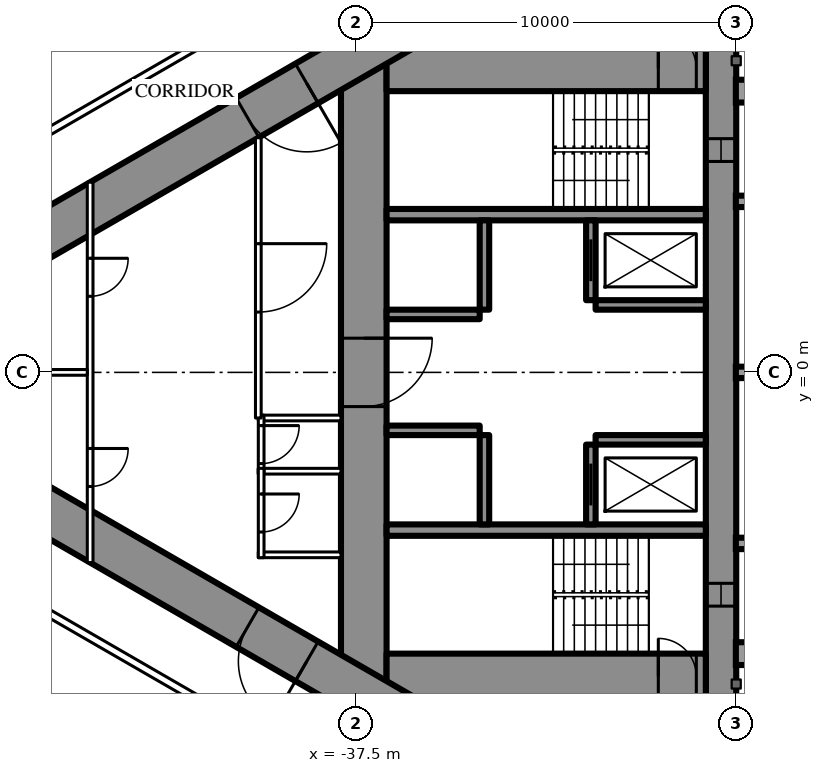
"""IFC4 building model, lengths in metres.
Left out: names, types, materials, properties, quantities, classifications, styles, units other than length and angle.
Written with IfcOpenShell. Run it as: python <this file> out.ifc"""

import sys

from ifc_helpers import new_model, si_unit, direction, frame, frame_2d, origin, place, context, subcontext, project, spatial, rectangle, extrude, element, fill, save


model = new_model("IFC4")
c1 = context("Model", 3, precision=1e-05, world=origin(), true_north=direction((0.0, 1.0)))
c2 = subcontext(c1, "Body", "Model", "MODEL_VIEW")
j1 = project(units=[si_unit("LENGTHUNIT", "METRE"), si_unit("PLANEANGLEUNIT", "RADIAN")], contexts=[c1])
p1 = place(None, origin())
s1 = spatial("IfcSite", under=j1, at=p1, CompositionType="ELEMENT")
p2 = place(p1, origin())
s2 = spatial("IfcBuilding", under=s1, at=p2, CompositionType="ELEMENT")
p3 = place(p2, frame((0.0, 0.0, 32.0)))
s3 = spatial("IfcBuildingStorey", under=s2, at=p3, CompositionType="ELEMENT", Elevation=32.0)
p4 = place(p3, frame((-27.9, 8.6, 0.0), z_axis=(0.0, 0.0, 1.0), x_axis=(0.0, -1.0, 0.0)))
e1 = element("IfcWall", 1, at=p4, inside=s3, PredefinedType="SHEAR", context=c2, shape_type="SweptSolid", body=[
    extrude(rectangle(XDim=17.2, YDim=0.8, at=frame_2d((8.6, 0.0))), origin(), (0.0, 0.0, 1.0), 3.5),
])
p5 = place(p4, frame((2.45, 0.0, 0.6)))
e2 = element("IfcOpeningElement", 2, at=p5, cuts=e1, PredefinedType="OPENING", context=c2, shape_type="SweptSolid", body=[
    extrude(rectangle(XDim=0.6, YDim=2.1, at=frame_2d((0.3, 1.05))), frame((0.0, 0.41, 0.0), z_axis=(0.0, -1.0, 0.0), x_axis=(1.0, 0.0, 0.0)), (0.0, 0.0, 1.0), 0.82),
])
p6 = place(p4, frame((14.15, 0.0, 0.6)))
e3 = element("IfcOpeningElement", 3, at=p6, cuts=e1, PredefinedType="OPENING", context=c2, shape_type="SweptSolid", body=[
    extrude(rectangle(XDim=0.6, YDim=2.1, at=frame_2d((0.3, 1.05))), frame((0.0, 0.41, 0.0), z_axis=(0.0, -1.0, 0.0), x_axis=(1.0, 0.0, 0.0)), (0.0, 0.0, 1.0), 0.82),
])
p7 = place(p3, frame((-37.3, 8.6, 0.0), z_axis=(0.0, 0.0, 1.0), x_axis=(0.0, -1.0, 0.0)))
e4 = element("IfcWall", 4, at=p7, inside=s3, PredefinedType="SHEAR", context=c2, shape_type="SweptSolid", body=[
    extrude(rectangle(XDim=17.2, YDim=1.2, at=frame_2d((8.6, 0.0))), origin(), (0.0, 0.0, 1.0), 3.5),
])
p8 = place(p7, frame((7.7, 0.0, 0.0)))
e5 = element("IfcOpeningElement", 5, at=p8, cuts=e4, PredefinedType="OPENING", context=c2, shape_type="SweptSolid", body=[
    extrude(rectangle(XDim=1.8, YDim=2.2, at=frame_2d((0.9, 1.1))), frame((0.0, 0.61, 0.0), z_axis=(0.0, -1.0, 0.0), x_axis=(1.0, 0.0, 0.0)), (0.0, 0.0, 1.0), 1.22),
])
p9 = place(p3, frame((-28.3, 8.0, 0.0), z_axis=(0.0, 0.0, 1.0), x_axis=(-1.0, 0.0, 0.0)))
e6 = element("IfcWall", 6, at=p9, inside=s3, PredefinedType="SHEAR", context=c2, shape_type="SweptSolid", body=[
    extrude(rectangle(XDim=8.4, YDim=1.2, at=frame_2d((4.2, 0.0))), origin(), (0.0, 0.0, 1.0), 3.5),
])
p10 = place(p9, frame((0.25, 0.0, 0.0)))
e7 = element("IfcOpeningElement", 7, at=p10, cuts=e6, PredefinedType="OPENING", context=c2, shape_type="SweptSolid", body=[
    extrude(rectangle(XDim=1.0, YDim=2.2, at=frame_2d((0.5, 1.1))), frame((0.0, 0.61, 0.0), z_axis=(0.0, -1.0, 0.0), x_axis=(1.0, 0.0, 0.0)), (0.0, 0.0, 1.0), 1.22),
])
p11 = place(p3, frame((-28.3, -8.0, 0.0), z_axis=(0.0, 0.0, 1.0), x_axis=(-1.0, 0.0, 0.0)))
e8 = element("IfcWall", 8, at=p11, inside=s3, PredefinedType="SHEAR", context=c2, shape_type="SweptSolid", body=[
    extrude(rectangle(XDim=8.4, YDim=1.2, at=frame_2d((4.2, 0.0))), origin(), (0.0, 0.0, 1.0), 3.5),
])
p12 = place(p11, frame((0.25, 0.0, 0.0)))
e9 = element("IfcOpeningElement", 9, at=p12, cuts=e8, PredefinedType="OPENING", context=c2, shape_type="SweptSolid", body=[
    extrude(rectangle(XDim=1.0, YDim=2.2, at=frame_2d((0.5, 1.1))), frame((0.0, 0.61, 0.0), z_axis=(0.0, -1.0, 0.0), x_axis=(1.0, 0.0, 0.0)), (0.0, 0.0, 1.0), 1.22),
])
for number, where, z_axis, x_axis in (
    (10, (-28.3, 4.15, 0.0), (0.0, 0.0, 1.0), (-1.0, 0.0, 0.0)),
    (11, (-28.3, -4.15, 0.0), (0.0, 0.0, 1.0), (-1.0, 0.0, 0.0)),
):
    element("IfcWall", number, at=place(p3, frame(where, z_axis=z_axis, x_axis=x_axis)), inside=s3, PredefinedType="SHEAR", context=c2, shape_type="SweptSolid", body=[
        extrude(rectangle(XDim=8.4, YDim=0.3, at=frame_2d((4.2, 0.0))), origin(), (0.0, 0.0, 1.0), 3.5),
    ])
p13 = place(p3, frame((-31.325, 4.0, 0.0), z_axis=(0.0, 0.0, 1.0), x_axis=(0.0, -1.0, 0.0)))
e12 = element("IfcWall", 12, at=p13, inside=s3, PredefinedType="SHEAR", context=c2, shape_type="SweptSolid", body=[
    extrude(rectangle(XDim=2.1, YDim=0.25, at=frame_2d((1.05, 0.0))), origin(), (0.0, 0.0, 1.0), 3.5),
])
p14 = place(p13, frame((0.5, 0.0, 0.0)))
e13 = element("IfcOpeningElement", 13, at=p14, cuts=e12, PredefinedType="OPENING", context=c2, shape_type="SweptSolid", body=[
    extrude(rectangle(XDim=1.1, YDim=2.2, at=frame_2d((0.55, 1.1))), frame((0.0, 0.135, 0.0), z_axis=(0.0, -1.0, 0.0), x_axis=(1.0, 0.0, 0.0)), (0.0, 0.0, 1.0), 0.27),
])
p15 = place(p3, frame((-34.125, 4.0, 0.0), z_axis=(0.0, 0.0, 1.0), x_axis=(0.0, -1.0, 0.0)))
e14 = element("IfcWall", 14, at=p15, inside=s3, PredefinedType="SHEAR", context=c2, shape_type="SweptSolid", body=[
    extrude(rectangle(XDim=2.35, YDim=0.25, at=frame_2d((1.175, 0.0))), origin(), (0.0, 0.0, 1.0), 3.5),
])
p16 = place(p3, frame((-28.3, 1.775, 0.0), z_axis=(0.0, 0.0, 1.0), x_axis=(-1.0, 0.0, 0.0)))
e15 = element("IfcWall", 15, at=p16, inside=s3, PredefinedType="SHEAR", context=c2, shape_type="SweptSolid", body=[
    extrude(rectangle(XDim=2.9, YDim=0.25, at=frame_2d((1.45, 0.0))), origin(), (0.0, 0.0, 1.0), 3.5),
])
p17 = place(p3, frame((-34.25, 1.525, 0.0), z_axis=(0.0, 0.0, 1.0), x_axis=(-1.0, 0.0, 0.0)))
e16 = element("IfcWall", 16, at=p17, inside=s3, PredefinedType="SHEAR", context=c2, shape_type="SweptSolid", body=[
    extrude(rectangle(XDim=2.45, YDim=0.25, at=frame_2d((1.225, 0.0))), origin(), (0.0, 0.0, 1.0), 3.5),
])
p18 = place(p3, frame((-31.325, -1.9, 0.0), z_axis=(0.0, 0.0, 1.0), x_axis=(0.0, -1.0, 0.0)))
e17 = element("IfcWall", 17, at=p18, inside=s3, PredefinedType="SHEAR", context=c2, shape_type="SweptSolid", body=[
    extrude(rectangle(XDim=2.1, YDim=0.25, at=frame_2d((1.05, 0.0))), origin(), (0.0, 0.0, 1.0), 3.5),
])
p19 = place(p18, frame((0.5, 0.0, 0.0)))
e18 = element("IfcOpeningElement", 18, at=p19, cuts=e17, PredefinedType="OPENING", context=c2, shape_type="SweptSolid", body=[
    extrude(rectangle(XDim=1.1, YDim=2.2, at=frame_2d((0.55, 1.1))), frame((0.0, 0.135, 0.0), z_axis=(0.0, -1.0, 0.0), x_axis=(1.0, 0.0, 0.0)), (0.0, 0.0, 1.0), 0.27),
])
p20 = place(p3, frame((-34.125, -1.65, 0.0), z_axis=(0.0, 0.0, 1.0), x_axis=(0.0, -1.0, 0.0)))
e19 = element("IfcWall", 19, at=p20, inside=s3, PredefinedType="SHEAR", context=c2, shape_type="SweptSolid", body=[
    extrude(rectangle(XDim=2.35, YDim=0.25, at=frame_2d((1.175, 0.0))), origin(), (0.0, 0.0, 1.0), 3.5),
])
p21 = place(p3, frame((-28.3, -1.775, 0.0), z_axis=(0.0, 0.0, 1.0), x_axis=(-1.0, 0.0, 0.0)))
e20 = element("IfcWall", 20, at=p21, inside=s3, PredefinedType="SHEAR", context=c2, shape_type="SweptSolid", body=[
    extrude(rectangle(XDim=2.9, YDim=0.25, at=frame_2d((1.45, 0.0))), origin(), (0.0, 0.0, 1.0), 3.5),
])
p22 = place(p3, frame((-34.25, -1.525, 0.0), z_axis=(0.0, 0.0, 1.0), x_axis=(-1.0, 0.0, 0.0)))
e21 = element("IfcWall", 21, at=p22, inside=s3, PredefinedType="SHEAR", context=c2, shape_type="SweptSolid", body=[
    extrude(rectangle(XDim=2.45, YDim=0.25, at=frame_2d((1.225, 0.0))), origin(), (0.0, 0.0, 1.0), 3.5),
])
p23 = place(p3, frame((-27.2, 14.3, 0.0), z_axis=(0.0, 0.0, 1.0), x_axis=(-0.866026593062, -0.499997940104, 0.0)))
e22 = element("IfcWall", 22, at=p23, inside=s3, PredefinedType="SHEAR", context=c2, shape_type="SweptSolid", body=[
    extrude(rectangle(XDim=28.946, YDim=1.2, at=frame_2d((14.473, 0.0))), origin(), (0.0, 0.0, 1.0), 3.5),
])
p24 = place(p23, frame((4.6, 0.0, 0.0)))
e23 = element("IfcOpeningElement", 23, at=p24, cuts=e22, PredefinedType="OPENING", context=c2, shape_type="SweptSolid", body=[
    extrude(rectangle(XDim=1.0, YDim=2.2, at=frame_2d((0.5, 1.1))), frame((0.0, 0.61, 0.0), z_axis=(0.0, -1.0, 0.0), x_axis=(1.0, 0.0, 0.0)), (0.0, 0.0, 1.0), 1.22),
])
p25 = place(p23, frame((13.395, 0.0, 0.0)))
e24 = element("IfcOpeningElement", 24, at=p25, cuts=e22, PredefinedType="OPENING", context=c2, shape_type="SweptSolid", body=[
    extrude(rectangle(XDim=1.8, YDim=2.2, at=frame_2d((0.9, 1.1))), frame((0.0, 0.61, 0.0), z_axis=(0.0, -1.0, 0.0), x_axis=(1.0, 0.0, 0.0)), (0.0, 0.0, 1.0), 1.22),
])
p26 = place(p3, frame((-27.2, -14.3, 0.0), z_axis=(0.0, 0.0, 1.0), x_axis=(-0.866024021859, 0.500002393557, 0.0)))
e25 = element("IfcWall", 25, at=p26, inside=s3, PredefinedType="SHEAR", context=c2, shape_type="SweptSolid", body=[
    extrude(rectangle(XDim=27.907, YDim=1.2, at=frame_2d((13.954, 0.0))), origin(), (0.0, 0.0, 1.0), 3.5),
])
p27 = place(p26, frame((4.6, 0.0, 0.0)))
e26 = element("IfcOpeningElement", 26, at=p27, cuts=e25, PredefinedType="OPENING", context=c2, shape_type="SweptSolid", body=[
    extrude(rectangle(XDim=1.0, YDim=2.2, at=frame_2d((0.5, 1.1))), frame((0.0, 0.61, 0.0), z_axis=(0.0, -1.0, 0.0), x_axis=(1.0, 0.0, 0.0)), (0.0, 0.0, 1.0), 1.22),
])
p28 = place(p26, frame((13.395, 0.0, 0.0)))
e27 = element("IfcOpeningElement", 27, at=p28, cuts=e25, PredefinedType="OPENING", context=c2, shape_type="SweptSolid", body=[
    extrude(rectangle(XDim=1.8, YDim=2.2, at=frame_2d((0.9, 1.1))), frame((0.0, 0.61, 0.0), z_axis=(0.0, -1.0, 0.0), x_axis=(1.0, 0.0, 0.0)), (0.0, 0.0, 1.0), 1.22),
])
p29 = place(p3, frame((-37.7, 10.894, 0.0), z_axis=(0.0, 0.0, 1.0), x_axis=(-0.866027905338, -0.499995667157, 0.0)))
e28 = element("IfcWall", 28, at=p29, inside=s3, PredefinedType="PARTITIONING", context=c2, shape_type="SweptSolid", body=[
    extrude(rectangle(XDim=21.787, YDim=0.2, at=frame_2d((10.894, 0.0))), origin(), (0.0, 0.0, 1.0), 3.25),
])
p30 = place(p29, frame((16.008, 0.0, 0.0)))
e29 = element("IfcOpeningElement", 29, at=p30, cuts=e28, PredefinedType="OPENING", context=c2, shape_type="SweptSolid", body=[
    extrude(rectangle(XDim=0.95, YDim=2.2, at=frame_2d((0.475, 1.1))), frame((0.0, 0.11, 0.0), z_axis=(0.0, -1.0, 0.0), x_axis=(1.0, 0.0, 0.0)), (0.0, 0.0, 1.0), 0.22),
])
p31 = place(p29, frame((20.058, 0.0, 0.0)))
e30 = element("IfcOpeningElement", 30, at=p31, cuts=e28, PredefinedType="OPENING", context=c2, shape_type="SweptSolid", body=[
    extrude(rectangle(XDim=0.95, YDim=2.2, at=frame_2d((0.475, 1.1))), frame((0.0, 0.11, 0.0), z_axis=(0.0, -1.0, 0.0), x_axis=(1.0, 0.0, 0.0)), (0.0, 0.0, 1.0), 0.22),
])
p32 = place(p29, frame((2.95, 0.0, 0.0)))
e31 = element("IfcOpeningElement", 31, at=p32, cuts=e28, PredefinedType="OPENING", context=c2, shape_type="SweptSolid", body=[
    extrude(rectangle(XDim=0.95, YDim=2.2, at=frame_2d((0.475, 1.1))), frame((0.0, 0.11, 0.0), z_axis=(0.0, -1.0, 0.0), x_axis=(1.0, 0.0, 0.0)), (0.0, 0.0, 1.0), 0.22),
])
p33 = place(p3, frame((-36.92, -11.344, 0.0), z_axis=(0.0, 0.0, 1.0), x_axis=(-0.866028313256, 0.499994960614, 0.0)))
e32 = element("IfcWall", 32, at=p33, inside=s3, PredefinedType="PARTITIONING", context=c2, shape_type="SweptSolid", body=[
    extrude(rectangle(XDim=22.568, YDim=0.2, at=frame_2d((11.284, 0.0))), origin(), (0.0, 0.0, 1.0), 3.25),
])
p34 = place(p33, frame((12.68, 0.0, 0.0)))
e33 = element("IfcOpeningElement", 33, at=p34, cuts=e32, PredefinedType="OPENING", context=c2, shape_type="SweptSolid", body=[
    extrude(rectangle(XDim=0.95, YDim=2.2, at=frame_2d((0.475, 1.1))), frame((0.0, 0.11, 0.0), z_axis=(0.0, -1.0, 0.0), x_axis=(1.0, 0.0, 0.0)), (0.0, 0.0, 1.0), 0.22),
])
p35 = place(p33, frame((3.35, 0.0, 0.0)))
e34 = element("IfcOpeningElement", 34, at=p35, cuts=e32, PredefinedType="OPENING", context=c2, shape_type="SweptSolid", body=[
    extrude(rectangle(XDim=1.0, YDim=2.2, at=frame_2d((0.5, 1.1))), frame((0.0, 0.11, 0.0), z_axis=(0.0, -1.0, 0.0), x_axis=(1.0, 0.0, 0.0)), (0.0, 0.0, 1.0), 0.22),
])
for number, where, z_axis, x_axis in (
    (35, (-37.9, -1.2, 0.0), (0.0, 0.0, 1.0), (-1.0, 0.0, 0.0)),
    (36, (-37.9, -2.6, 0.0), (0.0, 0.0, 1.0), (-1.0, 0.0, 0.0)),
    (37, (-37.9, -4.8, 0.0), (0.0, 0.0, 1.0), (-1.0, 0.0, 0.0)),
):
    element("IfcWall", number, at=place(p3, frame(where, z_axis=z_axis, x_axis=x_axis)), inside=s3, PredefinedType="PARTITIONING", context=c2, shape_type="SweptSolid", body=[
        extrude(rectangle(XDim=2.175, YDim=0.15, at=frame_2d((1.087, 0.0))), origin(), (0.0, 0.0, 1.0), 3.25),
    ])
p36 = place(p3, frame((-40.0, -1.125, 0.0), z_axis=(0.0, 0.0, 1.0), x_axis=(0.0, -1.0, 0.0)))
e38 = element("IfcWall", 38, at=p36, inside=s3, PredefinedType="PARTITIONING", context=c2, shape_type="SweptSolid", body=[
    extrude(rectangle(XDim=1.55, YDim=0.15, at=frame_2d((0.775, 0.0))), origin(), (0.0, 0.0, 1.0), 3.25),
])
p37 = place(p36, frame((0.275, 0.0, 0.0)))
e39 = element("IfcOpeningElement", 39, at=p37, cuts=e38, PredefinedType="OPENING", context=c2, shape_type="SweptSolid", body=[
    extrude(rectangle(XDim=1.0, YDim=2.2, at=frame_2d((0.5, 1.1))), frame((0.0, 0.085, 0.0), z_axis=(0.0, -1.0, 0.0), x_axis=(1.0, 0.0, 0.0)), (0.0, 0.0, 1.0), 0.17),
])
p38 = place(p3, frame((-40.0, -2.525, 0.0), z_axis=(0.0, 0.0, 1.0), x_axis=(0.0, -1.0, 0.0)))
e40 = element("IfcWall", 40, at=p38, inside=s3, PredefinedType="PARTITIONING", context=c2, shape_type="SweptSolid", body=[
    extrude(rectangle(XDim=2.35, YDim=0.15, at=frame_2d((1.175, 0.0))), origin(), (0.0, 0.0, 1.0), 3.25),
])
p39 = place(p38, frame((0.675, 0.0, 0.0)))
e41 = element("IfcOpeningElement", 41, at=p39, cuts=e40, PredefinedType="OPENING", context=c2, shape_type="SweptSolid", body=[
    extrude(rectangle(XDim=1.0, YDim=2.2, at=frame_2d((0.5, 1.1))), frame((0.0, 0.085, 0.0), z_axis=(0.0, -1.0, 0.0), x_axis=(1.0, 0.0, 0.0)), (0.0, 0.0, 1.0), 0.17),
])
p40 = place(p3, frame((-40.075, 6.174, 0.0), z_axis=(0.0, 0.0, 1.0), x_axis=(0.0, -1.0, 0.0)))
e42 = element("IfcWall", 42, at=p40, inside=s3, PredefinedType="PARTITIONING", context=c2, shape_type="SweptSolid", body=[
    extrude(rectangle(XDim=7.374, YDim=0.15, at=frame_2d((3.687, 0.0))), origin(), (0.0, 0.0, 1.0), 3.25),
])
p41 = place(p40, frame((2.787, 0.0, 0.0)))
e43 = element("IfcOpeningElement", 43, at=p41, cuts=e42, PredefinedType="OPENING", context=c2, shape_type="SweptSolid", body=[
    extrude(rectangle(XDim=1.8, YDim=2.2, at=frame_2d((0.9, 1.1))), frame((0.0, 0.085, 0.0), z_axis=(0.0, -1.0, 0.0), x_axis=(1.0, 0.0, 0.0)), (0.0, 0.0, 1.0), 0.17),
])
p42 = place(p3, frame((-44.5, 5.005, 0.0), z_axis=(0.0, 0.0, 1.0), x_axis=(0.0, -1.0, 0.0)))
e44 = element("IfcWall", 44, at=p42, inside=s3, PredefinedType="PARTITIONING", context=c2, shape_type="SweptSolid", body=[
    extrude(rectangle(XDim=10.009, YDim=0.15, at=frame_2d((5.005, 0.0))), origin(), (0.0, 0.0, 1.0), 2.45),
])
p43 = place(p42, frame((2.002, 0.0, 0.0)))
e45 = element("IfcOpeningElement", 45, at=p43, cuts=e44, PredefinedType="OPENING", context=c2, shape_type="SweptSolid", body=[
    extrude(rectangle(XDim=1.0, YDim=2.2, at=frame_2d((0.5, 1.1))), frame((0.0, 0.085, 0.0), z_axis=(0.0, -1.0, 0.0), x_axis=(1.0, 0.0, 0.0)), (0.0, 0.0, 1.0), 0.17),
])
p44 = place(p42, frame((7.007, 0.0, 0.0)))
e46 = element("IfcOpeningElement", 46, at=p44, cuts=e44, PredefinedType="OPENING", context=c2, shape_type="SweptSolid", body=[
    extrude(rectangle(XDim=1.0, YDim=2.2, at=frame_2d((0.5, 1.1))), frame((0.0, 0.085, 0.0), z_axis=(0.0, -1.0, 0.0), x_axis=(1.0, 0.0, 0.0)), (0.0, 0.0, 1.0), 0.17),
])
p45 = place(p3, frame((-44.575, 0.0, 0.0), z_axis=(0.0, 0.0, 1.0), x_axis=(-1.0, 0.0, 0.0)))
e47 = element("IfcWall", 47, at=p45, inside=s3, PredefinedType="PARTITIONING", context=c2, shape_type="SweptSolid", body=[
    extrude(rectangle(XDim=8.593, YDim=0.15, at=frame_2d((4.297, 0.0))), origin(), (0.0, 0.0, 1.0), 2.25),
])
p46 = place(p37, origin())
e48 = element("IfcDoor", 48, at=p46, inside=s3, OperationType="SINGLE_SWING_LEFT", PredefinedType="DOOR", context=c2, shape_type="SweptSolid", body=[
    extrude(rectangle(XDim=1.0, YDim=2.2, at=frame_2d((0.5, 1.1))), frame((0.0, 0.025, 0.0), z_axis=(0.0, -1.0, 0.0), x_axis=(1.0, 0.0, 0.0)), (0.0, 0.0, 1.0), 0.05),
])
fill(e39, e48)
p47 = place(p39, origin())
e49 = element("IfcDoor", 49, at=p47, inside=s3, OperationType="SINGLE_SWING_LEFT", PredefinedType="DOOR", context=c2, shape_type="SweptSolid", body=[
    extrude(rectangle(XDim=1.0, YDim=2.2, at=frame_2d((0.5, 1.1))), frame((0.0, 0.025, 0.0), z_axis=(0.0, -1.0, 0.0), x_axis=(1.0, 0.0, 0.0)), (0.0, 0.0, 1.0), 0.05),
])
fill(e41, e49)
p48 = place(p41, origin())
e50 = element("IfcDoor", 50, at=p48, inside=s3, OperationType="DOUBLE_DOOR_SINGLE_SWING", PredefinedType="DOOR", context=c2, shape_type="SweptSolid", body=[
    extrude(rectangle(XDim=1.8, YDim=2.2, at=frame_2d((0.9, 1.1))), frame((0.0, 0.025, 0.0), z_axis=(0.0, -1.0, 0.0), x_axis=(1.0, 0.0, 0.0)), (0.0, 0.0, 1.0), 0.05),
])
fill(e43, e50)
p49 = place(p43, origin())
e51 = element("IfcDoor", 51, at=p49, inside=s3, OperationType="SINGLE_SWING_LEFT", PredefinedType="DOOR", context=c2, shape_type="SweptSolid", body=[
    extrude(rectangle(XDim=1.0, YDim=2.2, at=frame_2d((0.5, 1.1))), frame((0.0, 0.025, 0.0), z_axis=(0.0, -1.0, 0.0), x_axis=(1.0, 0.0, 0.0)), (0.0, 0.0, 1.0), 0.05),
])
fill(e45, e51)
p50 = place(p44, origin())
e52 = element("IfcDoor", 52, at=p50, inside=s3, OperationType="SINGLE_SWING_LEFT", PredefinedType="DOOR", context=c2, shape_type="SweptSolid", body=[
    extrude(rectangle(XDim=1.0, YDim=2.2, at=frame_2d((0.5, 1.1))), frame((0.0, 0.025, 0.0), z_axis=(0.0, -1.0, 0.0), x_axis=(1.0, 0.0, 0.0)), (0.0, 0.0, 1.0), 0.05),
])
fill(e46, e52)
p51 = place(p25, origin())
e53 = element("IfcDoor", 53, at=p51, inside=s3, OperationType="DOUBLE_DOOR_SINGLE_SWING", PredefinedType="DOOR", context=c2, shape_type="SweptSolid", body=[
    extrude(rectangle(XDim=1.8, YDim=2.2, at=frame_2d((0.9, 1.1))), frame((0.0, 0.025, 0.0), z_axis=(0.0, -1.0, 0.0), x_axis=(1.0, 0.0, 0.0)), (0.0, 0.0, 1.0), 0.05),
])
fill(e24, e53)
p52 = place(p28, origin())
e54 = element("IfcDoor", 54, at=p52, inside=s3, OperationType="DOUBLE_DOOR_SINGLE_SWING", PredefinedType="DOOR", context=c2, shape_type="SweptSolid", body=[
    extrude(rectangle(XDim=1.8, YDim=2.2, at=frame_2d((0.9, 1.1))), frame((0.0, 0.025, 0.0), z_axis=(0.0, -1.0, 0.0), x_axis=(1.0, 0.0, 0.0)), (0.0, 0.0, 1.0), 0.05),
])
fill(e27, e54)
p53 = place(p8, origin())
e55 = element("IfcDoor", 55, at=p53, inside=s3, OperationType="DOUBLE_DOOR_SINGLE_SWING", PredefinedType="DOOR", context=c2, shape_type="SweptSolid", body=[
    extrude(rectangle(XDim=1.8, YDim=2.2, at=frame_2d((0.9, 1.1))), frame((0.0, 0.025, 0.0), z_axis=(0.0, -1.0, 0.0), x_axis=(1.0, 0.0, 0.0)), (0.0, 0.0, 1.0), 0.05),
])
fill(e5, e55)
p54 = place(p10, origin())
e56 = element("IfcDoor", 56, at=p54, inside=s3, OperationType="SINGLE_SWING_RIGHT", PredefinedType="DOOR", context=c2, shape_type="SweptSolid", body=[
    extrude(rectangle(XDim=1.0, YDim=2.2, at=frame_2d((0.5, 1.1))), frame((0.0, 0.025, 0.0), z_axis=(0.0, -1.0, 0.0), x_axis=(1.0, 0.0, 0.0)), (0.0, 0.0, 1.0), 0.05),
])
fill(e7, e56)
p55 = place(p12, origin())
e57 = element("IfcDoor", 57, at=p55, inside=s3, OperationType="SINGLE_SWING_RIGHT", PredefinedType="DOOR", context=c2, shape_type="SweptSolid", body=[
    extrude(rectangle(XDim=1.0, YDim=2.2, at=frame_2d((0.5, 1.1))), frame((0.0, 0.025, 0.0), z_axis=(0.0, -1.0, 0.0), x_axis=(1.0, 0.0, 0.0)), (0.0, 0.0, 1.0), 0.05),
])
fill(e9, e57)
p56 = place(p14, origin())
e58 = element("IfcDoor", 58, at=p56, inside=s3, OperationType="SLIDING_TO_LEFT", PredefinedType="USERDEFINED", context=c2, shape_type="SweptSolid", body=[
    extrude(rectangle(XDim=1.1, YDim=2.2, at=frame_2d((0.55, 1.1))), frame((0.0, 0.025, 0.0), z_axis=(0.0, -1.0, 0.0), x_axis=(1.0, 0.0, 0.0)), (0.0, 0.0, 1.0), 0.05),
])
fill(e13, e58)
p57 = place(p19, origin())
e59 = element("IfcDoor", 59, at=p57, inside=s3, OperationType="SLIDING_TO_LEFT", PredefinedType="USERDEFINED", context=c2, shape_type="SweptSolid", body=[
    extrude(rectangle(XDim=1.1, YDim=2.2, at=frame_2d((0.55, 1.1))), frame((0.0, 0.025, 0.0), z_axis=(0.0, -1.0, 0.0), x_axis=(1.0, 0.0, 0.0)), (0.0, 0.0, 1.0), 0.05),
])
fill(e18, e59)
p58 = place(p5, origin())
e60 = element("IfcWindow", 60, at=p58, inside=s3, PartitioningType="SINGLE_PANEL", PredefinedType="WINDOW", context=c2, shape_type="SweptSolid", body=[
    extrude(rectangle(XDim=0.6, YDim=2.1, at=frame_2d((0.3, 1.05))), frame((0.0, 0.03, 0.0), z_axis=(0.0, -1.0, 0.0), x_axis=(1.0, 0.0, 0.0)), (0.0, 0.0, 1.0), 0.06),
])
fill(e2, e60)
p59 = place(p6, origin())
e61 = element("IfcWindow", 61, at=p59, inside=s3, PartitioningType="SINGLE_PANEL", PredefinedType="WINDOW", context=c2, shape_type="SweptSolid", body=[
    extrude(rectangle(XDim=0.6, YDim=2.1, at=frame_2d((0.3, 1.05))), frame((0.0, 0.03, 0.0), z_axis=(0.0, -1.0, 0.0), x_axis=(1.0, 0.0, 0.0)), (0.0, 0.0, 1.0), 0.06),
])
fill(e3, e61)
save(model, sys.argv[1])
